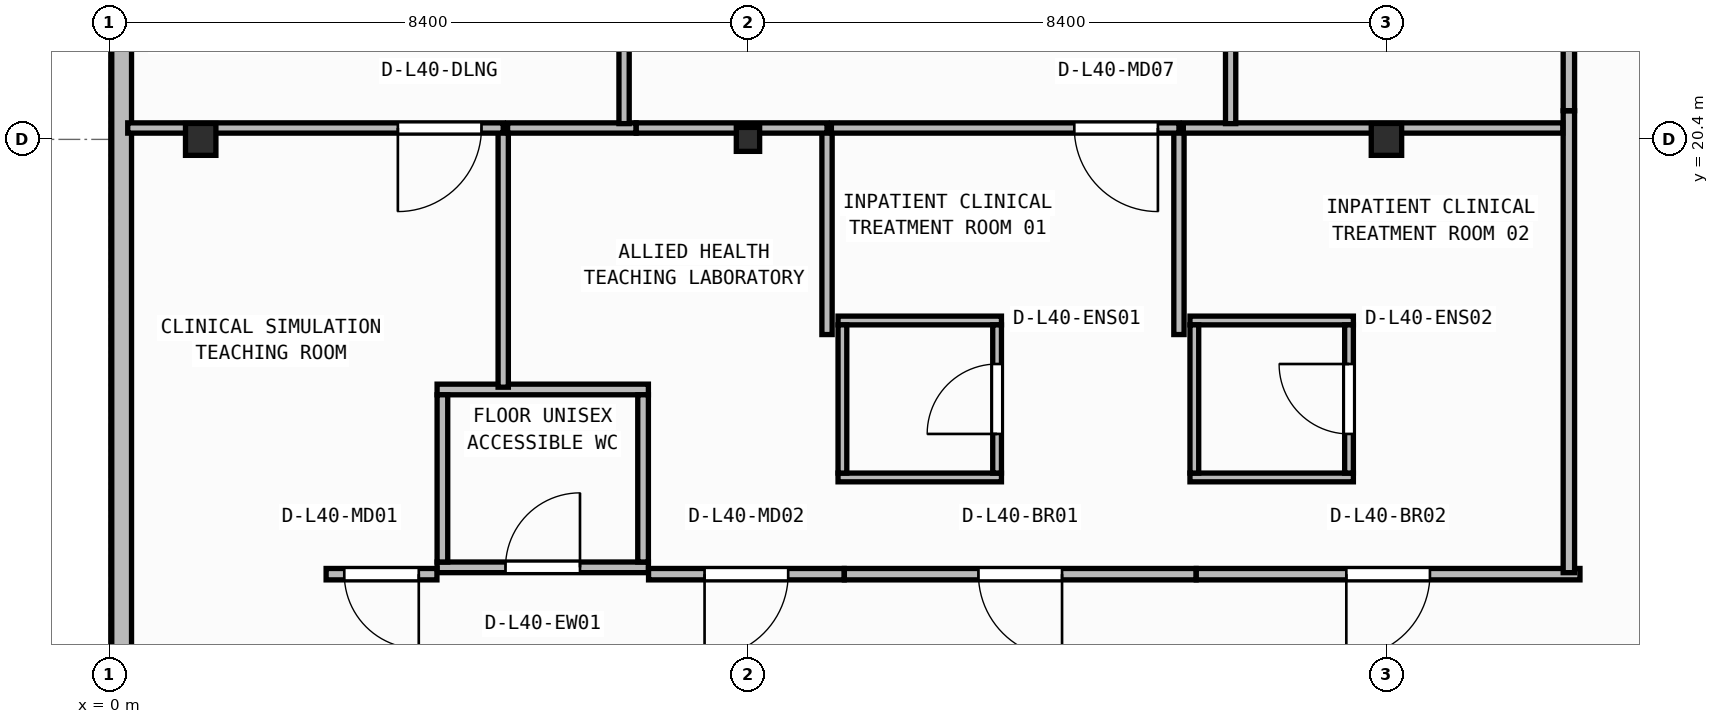
"""IFC4 building model, lengths in metres.
Left out: names, types, materials, properties, quantities, classifications, styles, units other than length and angle.
Written with IfcOpenShell. Run it as: python <this file> out.ifc"""

import sys

from ifc_helpers import new_model, si_unit, direction, frame, frame_2d, origin, origin_2d, place, context, subcontext, project, spatial, rectangle, i_section, extrude, element, fill, save


model = new_model("IFC4")
c1 = context("Model", 3, precision=1e-05, world=origin(), true_north=direction((0.0, 1.0)))
c2 = subcontext(c1, "Body", "Model", "MODEL_VIEW")
j1 = project(units=[si_unit("LENGTHUNIT", "METRE"), si_unit("PLANEANGLEUNIT", "RADIAN")], contexts=[c1])
p1 = place(None, origin())
s1 = spatial("IfcSite", under=j1, at=p1, CompositionType="ELEMENT")
p2 = place(p1, origin())
s2 = spatial("IfcBuilding", under=s1, at=p2, CompositionType="ELEMENT")
p3 = place(p2, frame((0.0, 0.0, 162.6)))
s3 = spatial("IfcBuildingStorey", under=s2, at=p3, CompositionType="ELEMENT", Elevation=162.6)
p4 = place(p3, frame((1.2, 20.4, 0.0), z_axis=(0.0, 0.0, 1.0), x_axis=(1.0, 0.0, 0.0)))
e1 = element("IfcColumn", 1, at=p4, inside=s3, PredefinedType="COLUMN", context=c2, shape_type="SweptSolid", body=[
    extrude(i_section(OverallWidth=0.4, OverallDepth=0.42, WebThickness=0.025, FlangeThickness=0.04, at=origin_2d()), origin(), (0.0, 0.0, 1.0), 3.95),
])
p5 = place(p3, frame((8.4, 20.4, 0.0), z_axis=(0.0, 0.0, 1.0), x_axis=(1.0, 0.0, 0.0)))
e2 = element("IfcColumn", 2, at=p5, inside=s3, PredefinedType="COLUMN", context=c2, shape_type="SweptSolid", body=[
    extrude(i_section(OverallWidth=0.307, OverallDepth=0.315, WebThickness=0.012, FlangeThickness=0.019, FilletRadius=0.017, at=origin_2d()), origin(), (0.0, 0.0, 1.0), 3.95),
])
p6 = place(p3, frame((16.8, 20.4, 0.0), z_axis=(0.0, 0.0, 1.0), x_axis=(1.0, 0.0, 0.0)))
e3 = element("IfcColumn", 3, at=p6, inside=s3, PredefinedType="COLUMN", context=c2, shape_type="SweptSolid", body=[
    extrude(i_section(OverallWidth=0.4, OverallDepth=0.42, WebThickness=0.025, FlangeThickness=0.04, at=origin_2d()), origin(), (0.0, 0.0, 1.0), 3.95),
])
p7 = place(p3, frame((0.16, 40.64, 0.0), z_axis=(0.0, 0.0, 1.0), x_axis=(0.0, -1.0, 0.0)))
e4 = element("IfcWall", 4, at=p7, inside=s3, PredefinedType="STANDARD", context=c2, shape_type="SweptSolid", body=[
    extrude(rectangle(XDim=37.88, YDim=0.26, at=frame_2d((18.94, 0.0))), origin(), (0.0, 0.0, 1.0), 3.71),
])
p8 = place(p7, frame((6.716, 0.0, 0.0)))
e5 = element("IfcOpeningElement", 5, at=p8, cuts=e4, PredefinedType="OPENING", context=c2, shape_type="SweptSolid", body=[
    extrude(rectangle(XDim=1.3, YDim=2.15, at=frame_2d((0.65, 1.075))), frame((0.0, 0.14, 0.0), z_axis=(0.0, -1.0, 0.0), x_axis=(1.0, 0.0, 0.0)), (0.0, 0.0, 1.0), 0.28),
])
p9 = place(p3, frame((4.31, 14.77, 0.0), z_axis=(0.0, 0.0, 1.0), x_axis=(1.0, 0.0, 0.0)))
e6 = element("IfcWall", 6, at=p9, inside=s3, PredefinedType="PARTITIONING", context=c2, shape_type="SweptSolid", body=[
    extrude(rectangle(XDim=2.78, YDim=0.14, at=frame_2d((1.39, 0.0))), origin(), (0.0, 0.0, 1.0), 3.71),
])
p10 = place(p9, frame((0.9, 0.0, 0.0)))
e7 = element("IfcOpeningElement", 7, at=p10, cuts=e6, PredefinedType="OPENING", context=c2, shape_type="SweptSolid", body=[
    extrude(rectangle(XDim=0.98, YDim=2.1, at=frame_2d((0.49, 1.05))), frame((0.0, 0.08, 0.0), z_axis=(0.0, -1.0, 0.0), x_axis=(1.0, 0.0, 0.0)), (0.0, 0.0, 1.0), 0.16),
])
p11 = place(p3, frame((4.31, 17.11, 0.0), z_axis=(0.0, 0.0, 1.0), x_axis=(1.0, 0.0, 0.0)))
e8 = element("IfcWall", 8, at=p11, inside=s3, PredefinedType="PARTITIONING", context=c2, shape_type="SweptSolid", body=[
    extrude(rectangle(XDim=2.78, YDim=0.14, at=frame_2d((1.39, 0.0))), origin(), (0.0, 0.0, 1.0), 3.71),
])
for number, where, z_axis, x_axis in (
    (9, (4.38, 14.84, 0.0), (0.0, 0.0, 1.0), (0.0, 1.0, 0.0)),
    (10, (7.02, 14.84, 0.0), (0.0, 0.0, 1.0), (0.0, 1.0, 0.0)),
):
    element("IfcWall", number, at=place(p3, frame(where, z_axis=z_axis, x_axis=x_axis)), inside=s3, PredefinedType="PARTITIONING", context=c2, shape_type="SweptSolid", body=[
        extrude(rectangle(XDim=2.2, YDim=0.14, at=frame_2d((1.1, 0.0))), origin(), (0.0, 0.0, 1.0), 3.71),
    ])
for number, where, z_axis, x_axis in (
    (11, (9.585, 15.952, 0.0), (0.0, 0.0, 1.0), (1.0, 0.0, 0.0)),
    (12, (9.585, 18.018, 0.0), (0.0, 0.0, 1.0), (1.0, 0.0, 0.0)),
):
    element("IfcWall", number, at=place(p3, frame(where, z_axis=z_axis, x_axis=x_axis)), inside=s3, PredefinedType="PARTITIONING", context=c2, shape_type="SweptSolid", body=[
        extrude(rectangle(XDim=2.15, YDim=0.115, at=frame_2d((1.075, 0.0))), origin(), (0.0, 0.0, 1.0), 3.71),
    ])
p12 = place(p3, frame((9.643, 16.01, 0.0), z_axis=(0.0, 0.0, 1.0), x_axis=(0.0, 1.0, 0.0)))
e13 = element("IfcWall", 13, at=p12, inside=s3, PredefinedType="PARTITIONING", context=c2, shape_type="SweptSolid", body=[
    extrude(rectangle(XDim=1.95, YDim=0.115, at=frame_2d((0.975, 0.0))), origin(), (0.0, 0.0, 1.0), 3.71),
])
p13 = place(p3, frame((11.677, 16.01, 0.0), z_axis=(0.0, 0.0, 1.0), x_axis=(0.0, 1.0, 0.0)))
e14 = element("IfcWall", 14, at=p13, inside=s3, PredefinedType="PARTITIONING", context=c2, shape_type="SweptSolid", body=[
    extrude(rectangle(XDim=1.95, YDim=0.115, at=frame_2d((0.975, 0.0))), origin(), (0.0, 0.0, 1.0), 3.71),
])
p14 = place(p13, frame((0.515, 0.0, 0.0)))
e15 = element("IfcOpeningElement", 15, at=p14, cuts=e14, PredefinedType="OPENING", context=c2, shape_type="SweptSolid", body=[
    extrude(rectangle(XDim=0.92, YDim=2.1, at=frame_2d((0.46, 1.05))), frame((0.0, 0.067, 0.0), z_axis=(0.0, -1.0, 0.0), x_axis=(1.0, 0.0, 0.0)), (0.0, 0.0, 1.0), 0.135),
])
for number, where, z_axis, x_axis in (
    (16, (14.215, 15.952, 0.0), (0.0, 0.0, 1.0), (1.0, 0.0, 0.0)),
    (17, (14.215, 18.018, 0.0), (0.0, 0.0, 1.0), (1.0, 0.0, 0.0)),
):
    element("IfcWall", number, at=place(p3, frame(where, z_axis=z_axis, x_axis=x_axis)), inside=s3, PredefinedType="PARTITIONING", context=c2, shape_type="SweptSolid", body=[
        extrude(rectangle(XDim=2.15, YDim=0.115, at=frame_2d((1.075, 0.0))), origin(), (0.0, 0.0, 1.0), 3.71),
    ])
p15 = place(p3, frame((14.272, 16.01, 0.0), z_axis=(0.0, 0.0, 1.0), x_axis=(0.0, 1.0, 0.0)))
e18 = element("IfcWall", 18, at=p15, inside=s3, PredefinedType="PARTITIONING", context=c2, shape_type="SweptSolid", body=[
    extrude(rectangle(XDim=1.95, YDim=0.115, at=frame_2d((0.975, 0.0))), origin(), (0.0, 0.0, 1.0), 3.71),
])
p16 = place(p3, frame((16.308, 16.01, 0.0), z_axis=(0.0, 0.0, 1.0), x_axis=(0.0, 1.0, 0.0)))
e19 = element("IfcWall", 19, at=p16, inside=s3, PredefinedType="PARTITIONING", context=c2, shape_type="SweptSolid", body=[
    extrude(rectangle(XDim=1.95, YDim=0.115, at=frame_2d((0.975, 0.0))), origin(), (0.0, 0.0, 1.0), 3.71),
])
p17 = place(p16, frame((0.515, 0.0, 0.0)))
e20 = element("IfcOpeningElement", 20, at=p17, cuts=e19, PredefinedType="OPENING", context=c2, shape_type="SweptSolid", body=[
    extrude(rectangle(XDim=0.92, YDim=2.1, at=frame_2d((0.46, 1.05))), frame((0.0, 0.067, 0.0), z_axis=(0.0, -1.0, 0.0), x_axis=(1.0, 0.0, 0.0)), (0.0, 0.0, 1.0), 0.135),
])
p18 = place(p3, frame((4.308, 14.68, 0.0), z_axis=(0.0, 0.0, 1.0), x_axis=(-1.0, 0.0, 0.0)))
e21 = element("IfcWall", 21, at=p18, inside=s3, PredefinedType="PARTITIONING", context=c2, shape_type="SweptSolid", body=[
    extrude(rectangle(XDim=1.458, YDim=0.15, at=frame_2d((0.729, 0.0))), origin(), (0.0, 0.0, 1.0), 3.71),
])
p19 = place(p18, frame((0.239, 0.0, 0.0)))
e22 = element("IfcOpeningElement", 22, at=p19, cuts=e21, PredefinedType="OPENING", context=c2, shape_type="SweptSolid", body=[
    extrude(rectangle(XDim=0.98, YDim=2.1, at=frame_2d((0.49, 1.05))), frame((0.0, 0.085, 0.0), z_axis=(0.0, -1.0, 0.0), x_axis=(1.0, 0.0, 0.0)), (0.0, 0.0, 1.0), 0.17),
])
p20 = place(p3, frame((9.666, 14.68, 0.0), z_axis=(0.0, 0.0, 1.0), x_axis=(-1.0, 0.0, 0.0)))
e23 = element("IfcWall", 23, at=p20, inside=s3, PredefinedType="PARTITIONING", context=c2, shape_type="SweptSolid", body=[
    extrude(rectangle(XDim=2.574, YDim=0.15, at=frame_2d((1.287, 0.0))), origin(), (0.0, 0.0, 1.0), 3.71),
])
p21 = place(p20, frame((0.737, 0.0, 0.0)))
e24 = element("IfcOpeningElement", 24, at=p21, cuts=e23, PredefinedType="OPENING", context=c2, shape_type="SweptSolid", body=[
    extrude(rectangle(XDim=1.1, YDim=2.1, at=frame_2d((0.55, 1.05))), frame((0.0, 0.085, 0.0), z_axis=(0.0, -1.0, 0.0), x_axis=(1.0, 0.0, 0.0)), (0.0, 0.0, 1.0), 0.17),
])
p22 = place(p3, frame((14.296, 14.68, 0.0), z_axis=(0.0, 0.0, 1.0), x_axis=(-1.0, 0.0, 0.0)))
e25 = element("IfcWall", 25, at=p22, inside=s3, PredefinedType="PARTITIONING", context=c2, shape_type="SweptSolid", body=[
    extrude(rectangle(XDim=4.628, YDim=0.15, at=frame_2d((2.314, 0.0))), origin(), (0.0, 0.0, 1.0), 3.71),
])
p23 = place(p22, frame((1.764, 0.0, 0.0)))
e26 = element("IfcOpeningElement", 26, at=p23, cuts=e25, PredefinedType="OPENING", context=c2, shape_type="SweptSolid", body=[
    extrude(rectangle(XDim=1.1, YDim=2.1, at=frame_2d((0.55, 1.05))), frame((0.0, 0.085, 0.0), z_axis=(0.0, -1.0, 0.0), x_axis=(1.0, 0.0, 0.0)), (0.0, 0.0, 1.0), 0.17),
])
p24 = place(p3, frame((19.346, 14.68, 0.0), z_axis=(0.0, 0.0, 1.0), x_axis=(-1.0, 0.0, 0.0)))
e27 = element("IfcWall", 27, at=p24, inside=s3, PredefinedType="PARTITIONING", context=c2, shape_type="SweptSolid", body=[
    extrude(rectangle(XDim=5.048, YDim=0.15, at=frame_2d((2.524, 0.0))), origin(), (0.0, 0.0, 1.0), 3.71),
])
p25 = place(p24, frame((1.974, 0.0, 0.0)))
e28 = element("IfcOpeningElement", 28, at=p25, cuts=e27, PredefinedType="OPENING", context=c2, shape_type="SweptSolid", body=[
    extrude(rectangle(XDim=1.1, YDim=2.1, at=frame_2d((0.55, 1.05))), frame((0.0, 0.085, 0.0), z_axis=(0.0, -1.0, 0.0), x_axis=(1.0, 0.0, 0.0)), (0.0, 0.0, 1.0), 0.17),
])
p26 = place(p3, frame((19.2, 20.776, 0.0), z_axis=(0.0, 0.0, 1.0), x_axis=(0.0, -1.0, 0.0)))
e29 = element("IfcWall", 29, at=p26, inside=s3, PredefinedType="PARTITIONING", context=c2, shape_type="SweptSolid", body=[
    extrude(rectangle(XDim=6.076, YDim=0.15, at=frame_2d((3.038, 0.0))), origin(), (0.0, 0.0, 1.0), 3.71),
])
p27 = place(p3, frame((19.2, 27.26, 0.0), z_axis=(0.0, 0.0, 1.0), x_axis=(0.0, -1.0, 0.0)))
e30 = element("IfcWall", 30, at=p27, inside=s3, PredefinedType="PARTITIONING", context=c2, shape_type="SweptSolid", body=[
    extrude(rectangle(XDim=6.482, YDim=0.15, at=frame_2d((3.241, 0.0))), origin(), (0.0, 0.0, 1.0), 3.71),
])
p28 = place(p27, frame((2.068, 0.0, 0.0)))
e31 = element("IfcOpeningElement", 31, at=p28, cuts=e30, PredefinedType="OPENING", context=c2, shape_type="SweptSolid", body=[
    extrude(rectangle(XDim=1.1, YDim=2.1, at=frame_2d((0.55, 1.05))), frame((0.0, 0.085, 0.0), z_axis=(0.0, -1.0, 0.0), x_axis=(1.0, 0.0, 0.0)), (0.0, 0.0, 1.0), 0.17),
])
p29 = place(p3, frame((5.18, 17.14, 0.0), z_axis=(0.0, 0.0, 1.0), x_axis=(0.0, 1.0, 0.0)))
e32 = element("IfcWall", 32, at=p29, inside=s3, PredefinedType="PARTITIONING", context=c2, shape_type="SweptSolid", body=[
    extrude(rectangle(XDim=3.41, YDim=0.135, at=frame_2d((1.705, 0.0))), origin(), (0.0, 0.0, 1.0), 3.71),
])
p30 = place(p3, frame((5.18, 20.55, 0.0), z_axis=(0.0, 0.0, 1.0), x_axis=(-1.0, 0.0, 0.0)))
e33 = element("IfcWall", 33, at=p30, inside=s3, PredefinedType="PARTITIONING", context=c2, shape_type="SweptSolid", body=[
    extrude(rectangle(XDim=4.94, YDim=0.135, at=frame_2d((2.47, 0.0))), origin(), (0.0, 0.0, 1.0), 3.083),
])
p31 = place(p30, frame((0.286, 0.0, 0.0)))
e34 = element("IfcOpeningElement", 34, at=p31, cuts=e33, PredefinedType="OPENING", context=c2, shape_type="SweptSolid", body=[
    extrude(rectangle(XDim=1.1, YDim=2.1, at=frame_2d((0.55, 1.05))), frame((0.0, 0.077, 0.0), z_axis=(0.0, -1.0, 0.0), x_axis=(1.0, 0.0, 0.0)), (0.0, 0.0, 1.0), 0.155),
])
p32 = place(p3, frame((9.44, 17.833, 0.0), z_axis=(0.0, 0.0, 1.0), x_axis=(0.0, 1.0, 0.0)))
e35 = element("IfcWall", 35, at=p32, inside=s3, PredefinedType="PARTITIONING", context=c2, shape_type="SweptSolid", body=[
    extrude(rectangle(XDim=2.718, YDim=0.135, at=frame_2d((1.359, 0.0))), origin(), (0.0, 0.0, 1.0), 3.71),
])
p33 = place(p3, frame((6.928, 20.55, 0.0), z_axis=(0.0, 0.0, 1.0), x_axis=(-1.0, 0.0, 0.0)))
e36 = element("IfcWall", 36, at=p33, inside=s3, PredefinedType="PARTITIONING", context=c2, shape_type="SweptSolid", body=[
    extrude(rectangle(XDim=1.691, YDim=0.135, at=frame_2d((0.845, 0.0))), origin(), (0.0, 0.0, 1.0), 3.083),
])
p34 = place(p3, frame((9.44, 20.55, 0.0), z_axis=(0.0, 0.0, 1.0), x_axis=(-1.0, 0.0, 0.0)))
e37 = element("IfcWall", 37, at=p34, inside=s3, PredefinedType="PARTITIONING", context=c2, shape_type="SweptSolid", body=[
    extrude(rectangle(XDim=2.51, YDim=0.135, at=frame_2d((1.255, 0.0))), origin(), (0.0, 0.0, 1.0), 3.083),
])
p35 = place(p3, frame((14.07, 17.833, 0.0), z_axis=(0.0, 0.0, 1.0), x_axis=(0.0, 1.0, 0.0)))
e38 = element("IfcWall", 38, at=p35, inside=s3, PredefinedType="PARTITIONING", context=c2, shape_type="SweptSolid", body=[
    extrude(rectangle(XDim=2.718, YDim=0.135, at=frame_2d((1.359, 0.0))), origin(), (0.0, 0.0, 1.0), 3.71),
])
p36 = place(p3, frame((14.07, 20.55, 0.0), z_axis=(0.0, 0.0, 1.0), x_axis=(-1.0, 0.0, 0.0)))
e39 = element("IfcWall", 39, at=p36, inside=s3, PredefinedType="PARTITIONING", context=c2, shape_type="SweptSolid", body=[
    extrude(rectangle(XDim=4.573, YDim=0.135, at=frame_2d((2.286, 0.0))), origin(), (0.0, 0.0, 1.0), 3.083),
])
p37 = place(p36, frame((0.277, 0.0, 0.0)))
e40 = element("IfcOpeningElement", 40, at=p37, cuts=e39, PredefinedType="OPENING", context=c2, shape_type="SweptSolid", body=[
    extrude(rectangle(XDim=1.1, YDim=2.1, at=frame_2d((0.55, 1.05))), frame((0.0, 0.077, 0.0), z_axis=(0.0, -1.0, 0.0), x_axis=(1.0, 0.0, 0.0)), (0.0, 0.0, 1.0), 0.155),
])
p38 = place(p3, frame((19.12, 20.55, 0.0), z_axis=(0.0, 0.0, 1.0), x_axis=(-1.0, 0.0, 0.0)))
e41 = element("IfcWall", 41, at=p38, inside=s3, PredefinedType="PARTITIONING", context=c2, shape_type="SweptSolid", body=[
    extrude(rectangle(XDim=4.993, YDim=0.135, at=frame_2d((2.496, 0.0))), origin(), (0.0, 0.0, 1.0), 3.083),
])
for number, where, z_axis, x_axis in (
    (42, (6.77, 20.607, 0.0), (0.0, 0.0, 1.0), (0.0, 1.0, 0.0)),
    (43, (14.75, 20.607, 0.0), (0.0, 0.0, 1.0), (0.0, 1.0, 0.0)),
):
    element("IfcWall", number, at=place(p3, frame(where, z_axis=z_axis, x_axis=x_axis)), inside=s3, PredefinedType="PARTITIONING", context=c2, shape_type="SweptSolid", body=[
        extrude(rectangle(XDim=6.493, YDim=0.135, at=frame_2d((3.246, 0.0))), origin(), (0.0, 0.0, 1.0), 3.71),
    ])
p39 = place(p10, origin())
e44 = element("IfcDoor", 44, at=p39, inside=s3, OperationType="SINGLE_SWING_RIGHT", PredefinedType="DOOR", context=c2, shape_type="SweptSolid", body=[
    extrude(rectangle(XDim=0.98, YDim=2.1, at=frame_2d((0.49, 1.05))), frame((0.0, 0.025, 0.0), z_axis=(0.0, -1.0, 0.0), x_axis=(1.0, 0.0, 0.0)), (0.0, 0.0, 1.0), 0.05),
])
fill(e7, e44)
p40 = place(p14, origin())
e45 = element("IfcDoor", 45, at=p40, inside=s3, OperationType="SINGLE_SWING_LEFT", PredefinedType="DOOR", context=c2, shape_type="SweptSolid", body=[
    extrude(rectangle(XDim=0.92, YDim=2.1, at=frame_2d((0.46, 1.05))), frame((0.0, 0.025, 0.0), z_axis=(0.0, -1.0, 0.0), x_axis=(1.0, 0.0, 0.0)), (0.0, 0.0, 1.0), 0.05),
])
fill(e15, e45)
p41 = place(p17, origin())
e46 = element("IfcDoor", 46, at=p41, inside=s3, OperationType="SINGLE_SWING_RIGHT", PredefinedType="DOOR", context=c2, shape_type="SweptSolid", body=[
    extrude(rectangle(XDim=0.92, YDim=2.1, at=frame_2d((0.46, 1.05))), frame((0.0, 0.025, 0.0), z_axis=(0.0, -1.0, 0.0), x_axis=(1.0, 0.0, 0.0)), (0.0, 0.0, 1.0), 0.05),
])
fill(e20, e46)
p42 = place(p19, origin())
e47 = element("IfcDoor", 47, at=p42, inside=s3, OperationType="SINGLE_SWING_LEFT", PredefinedType="DOOR", context=c2, shape_type="SweptSolid", body=[
    extrude(rectangle(XDim=0.98, YDim=2.1, at=frame_2d((0.49, 1.05))), frame((0.0, 0.025, 0.0), z_axis=(0.0, -1.0, 0.0), x_axis=(1.0, 0.0, 0.0)), (0.0, 0.0, 1.0), 0.05),
])
fill(e22, e47)
p43 = place(p21, origin())
e48 = element("IfcDoor", 48, at=p43, inside=s3, OperationType="SINGLE_SWING_RIGHT", PredefinedType="DOOR", context=c2, shape_type="SweptSolid", body=[
    extrude(rectangle(XDim=1.1, YDim=2.1, at=frame_2d((0.55, 1.05))), frame((0.0, 0.025, 0.0), z_axis=(0.0, -1.0, 0.0), x_axis=(1.0, 0.0, 0.0)), (0.0, 0.0, 1.0), 0.05),
])
fill(e24, e48)
p44 = place(p23, origin())
e49 = element("IfcDoor", 49, at=p44, inside=s3, OperationType="SINGLE_SWING_LEFT", PredefinedType="DOOR", context=c2, shape_type="SweptSolid", body=[
    extrude(rectangle(XDim=1.1, YDim=2.1, at=frame_2d((0.55, 1.05))), frame((0.0, 0.025, 0.0), z_axis=(0.0, -1.0, 0.0), x_axis=(1.0, 0.0, 0.0)), (0.0, 0.0, 1.0), 0.05),
])
fill(e26, e49)
p45 = place(p25, origin())
e50 = element("IfcDoor", 50, at=p45, inside=s3, OperationType="SINGLE_SWING_RIGHT", PredefinedType="DOOR", context=c2, shape_type="SweptSolid", body=[
    extrude(rectangle(XDim=1.1, YDim=2.1, at=frame_2d((0.55, 1.05))), frame((0.0, 0.025, 0.0), z_axis=(0.0, -1.0, 0.0), x_axis=(1.0, 0.0, 0.0)), (0.0, 0.0, 1.0), 0.05),
])
fill(e28, e50)
p46 = place(p31, origin())
e51 = element("IfcDoor", 51, at=p46, inside=s3, OperationType="SINGLE_SWING_RIGHT", PredefinedType="DOOR", context=c2, shape_type="SweptSolid", body=[
    extrude(rectangle(XDim=1.1, YDim=2.1, at=frame_2d((0.55, 1.05))), frame((0.0, 0.025, 0.0), z_axis=(0.0, -1.0, 0.0), x_axis=(1.0, 0.0, 0.0)), (0.0, 0.0, 1.0), 0.05),
])
fill(e34, e51)
p47 = place(p37, origin())
e52 = element("IfcDoor", 52, at=p47, inside=s3, OperationType="SINGLE_SWING_LEFT", PredefinedType="DOOR", context=c2, shape_type="SweptSolid", body=[
    extrude(rectangle(XDim=1.1, YDim=2.1, at=frame_2d((0.55, 1.05))), frame((0.0, 0.025, 0.0), z_axis=(0.0, -1.0, 0.0), x_axis=(1.0, 0.0, 0.0)), (0.0, 0.0, 1.0), 0.05),
])
fill(e40, e52)
save(model, sys.argv[1])
